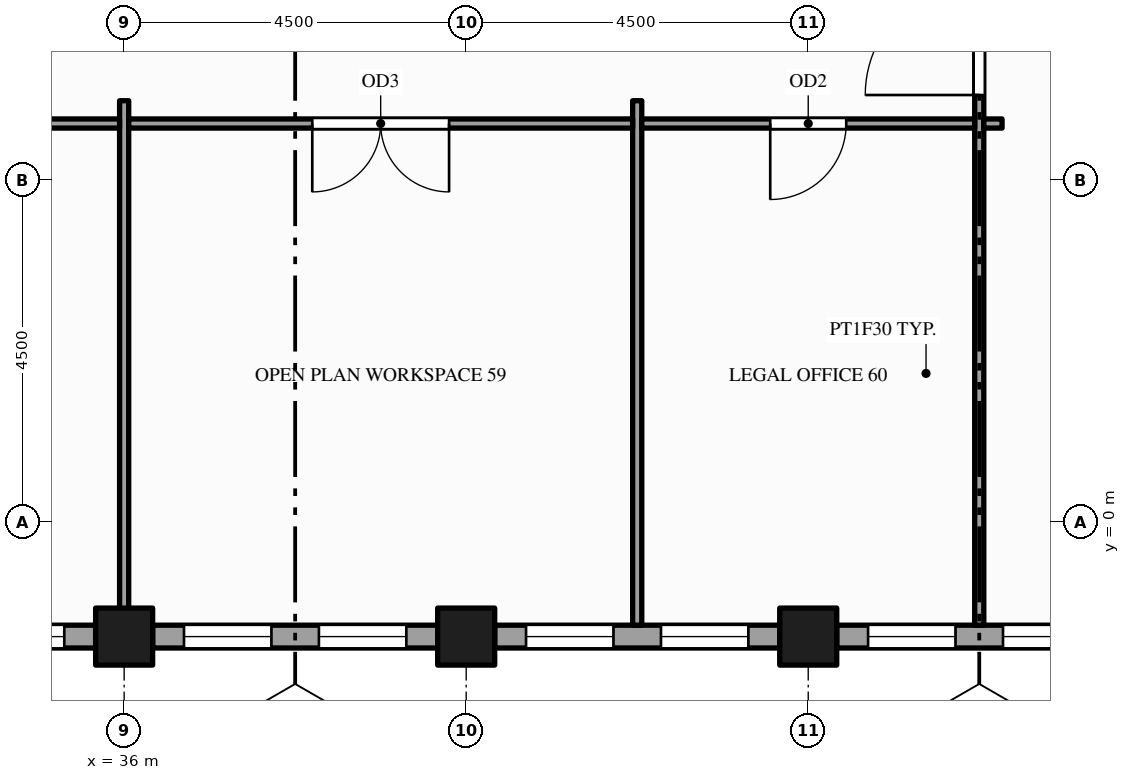
"""IFC4 building model, lengths in metres.
Left out: names, types, materials, properties, quantities, classifications, styles, units other than length and angle.
Written with IfcOpenShell. Run it as: python <this file> out.ifc"""

import sys

from ifc_helpers import new_model, si_unit, direction, frame, frame_2d, origin, origin_2d, place, context, subcontext, project, spatial, rectangle, hollow_rectangle, extrude, element, fill, save


model = new_model("IFC4")
c1 = context("Model", 3, precision=1e-05, world=origin(), true_north=direction((0.0, 1.0)))
c2 = subcontext(c1, "Body", "Model", "MODEL_VIEW")
j1 = project(units=[si_unit("LENGTHUNIT", "METRE"), si_unit("PLANEANGLEUNIT", "RADIAN")], contexts=[c1])
p1 = place(None, origin())
s1 = spatial("IfcSite", under=j1, at=p1, CompositionType="ELEMENT")
p2 = place(p1, origin())
s2 = spatial("IfcBuilding", under=s1, at=p2, CompositionType="ELEMENT")
p3 = place(p2, frame((0.0, 0.0, 207.0)))
s3 = spatial("IfcBuildingStorey", under=s2, at=p3, CompositionType="ELEMENT", Elevation=207.0)
for number, where, z_axis, x_axis in (
    (1, (36.0, -1.5, -0.15), (0.0, 0.0, 1.0), (1.0, 0.0, 0.0)),
    (2, (40.5, -1.5, -0.15), (0.0, 0.0, 1.0), (1.0, 0.0, 0.0)),
    (3, (45.0, -1.5, -0.15), (0.0, 0.0, 1.0), (1.0, 0.0, 0.0)),
):
    element("IfcColumn", number, at=place(p3, frame(where, z_axis=z_axis, x_axis=x_axis)), inside=s3, PredefinedType="COLUMN", context=c2, shape_type="SweptSolid", body=[
        extrude(hollow_rectangle(XDim=0.75, YDim=0.75, WallThickness=0.036, at=origin_2d()), origin(), (0.0, 0.0, 1.0), 4.0),
    ])
p4 = place(p3, frame((31.875, -1.5, 0.0), z_axis=(0.0, 0.0, 1.0), x_axis=(1.0, 0.0, 0.0)))
e4 = element("IfcWall", 4, at=p4, inside=s3, PredefinedType="STANDARD", context=c2, shape_type="SweptSolid", body=[
    extrude(rectangle(XDim=3.75, YDim=0.3, at=frame_2d((1.875, 0.0))), origin(), (0.0, 0.0, 1.0), 2.87),
])
p5 = place(p4, frame((0.413, 0.0, 0.9)))
e5 = element("IfcOpeningElement", 5, at=p5, cuts=e4, PredefinedType="OPENING", context=c2, shape_type="SweptSolid", body=[
    extrude(rectangle(XDim=1.15, YDim=1.75, at=frame_2d((0.575, 0.875))), frame((0.0, 0.16, 0.0), z_axis=(0.0, -1.0, 0.0), x_axis=(1.0, 0.0, 0.0)), (0.0, 0.0, 1.0), 0.32),
])
p6 = place(p4, frame((2.188, 0.0, 0.9)))
e6 = element("IfcOpeningElement", 6, at=p6, cuts=e4, PredefinedType="OPENING", context=c2, shape_type="SweptSolid", body=[
    extrude(rectangle(XDim=1.15, YDim=1.75, at=frame_2d((0.575, 0.875))), frame((0.0, 0.16, 0.0), z_axis=(0.0, -1.0, 0.0), x_axis=(1.0, 0.0, 0.0)), (0.0, 0.0, 1.0), 0.32),
])
p7 = place(p3, frame((36.375, -1.5, 0.0), z_axis=(0.0, 0.0, 1.0), x_axis=(1.0, 0.0, 0.0)))
e7 = element("IfcWall", 7, at=p7, inside=s3, PredefinedType="STANDARD", context=c2, shape_type="SweptSolid", body=[
    extrude(rectangle(XDim=3.75, YDim=0.3, at=frame_2d((1.875, 0.0))), origin(), (0.0, 0.0, 1.0), 2.87),
])
p8 = place(p7, frame((0.413, 0.0, 0.9)))
e8 = element("IfcOpeningElement", 8, at=p8, cuts=e7, PredefinedType="OPENING", context=c2, shape_type="SweptSolid", body=[
    extrude(rectangle(XDim=1.15, YDim=1.75, at=frame_2d((0.575, 0.875))), frame((0.0, 0.16, 0.0), z_axis=(0.0, -1.0, 0.0), x_axis=(1.0, 0.0, 0.0)), (0.0, 0.0, 1.0), 0.32),
])
p9 = place(p7, frame((2.188, 0.0, 0.9)))
e9 = element("IfcOpeningElement", 9, at=p9, cuts=e7, PredefinedType="OPENING", context=c2, shape_type="SweptSolid", body=[
    extrude(rectangle(XDim=1.15, YDim=1.75, at=frame_2d((0.575, 0.875))), frame((0.0, 0.16, 0.0), z_axis=(0.0, -1.0, 0.0), x_axis=(1.0, 0.0, 0.0)), (0.0, 0.0, 1.0), 0.32),
])
p10 = place(p3, frame((40.875, -1.5, 0.0), z_axis=(0.0, 0.0, 1.0), x_axis=(1.0, 0.0, 0.0)))
e10 = element("IfcWall", 10, at=p10, inside=s3, PredefinedType="STANDARD", context=c2, shape_type="SweptSolid", body=[
    extrude(rectangle(XDim=3.75, YDim=0.3, at=frame_2d((1.875, 0.0))), origin(), (0.0, 0.0, 1.0), 2.87),
])
p11 = place(p10, frame((0.413, 0.0, 0.9)))
e11 = element("IfcOpeningElement", 11, at=p11, cuts=e10, PredefinedType="OPENING", context=c2, shape_type="SweptSolid", body=[
    extrude(rectangle(XDim=1.15, YDim=1.75, at=frame_2d((0.575, 0.875))), frame((0.0, 0.16, 0.0), z_axis=(0.0, -1.0, 0.0), x_axis=(1.0, 0.0, 0.0)), (0.0, 0.0, 1.0), 0.32),
])
p12 = place(p10, frame((2.188, 0.0, 0.9)))
e12 = element("IfcOpeningElement", 12, at=p12, cuts=e10, PredefinedType="OPENING", context=c2, shape_type="SweptSolid", body=[
    extrude(rectangle(XDim=1.15, YDim=1.75, at=frame_2d((0.575, 0.875))), frame((0.0, 0.16, 0.0), z_axis=(0.0, -1.0, 0.0), x_axis=(1.0, 0.0, 0.0)), (0.0, 0.0, 1.0), 0.32),
])
p13 = place(p3, frame((45.375, -1.5, 0.0), z_axis=(0.0, 0.0, 1.0), x_axis=(1.0, 0.0, 0.0)))
e13 = element("IfcWall", 13, at=p13, inside=s3, PredefinedType="STANDARD", context=c2, shape_type="SweptSolid", body=[
    extrude(rectangle(XDim=3.75, YDim=0.3, at=frame_2d((1.875, 0.0))), origin(), (0.0, 0.0, 1.0), 2.87),
])
p14 = place(p13, frame((0.413, 0.0, 0.9)))
e14 = element("IfcOpeningElement", 14, at=p14, cuts=e13, PredefinedType="OPENING", context=c2, shape_type="SweptSolid", body=[
    extrude(rectangle(XDim=1.15, YDim=1.75, at=frame_2d((0.575, 0.875))), frame((0.0, 0.16, 0.0), z_axis=(0.0, -1.0, 0.0), x_axis=(1.0, 0.0, 0.0)), (0.0, 0.0, 1.0), 0.32),
])
p15 = place(p13, frame((2.188, 0.0, 0.9)))
e15 = element("IfcOpeningElement", 15, at=p15, cuts=e13, PredefinedType="OPENING", context=c2, shape_type="SweptSolid", body=[
    extrude(rectangle(XDim=1.15, YDim=1.75, at=frame_2d((0.575, 0.875))), frame((0.0, 0.16, 0.0), z_axis=(0.0, -1.0, 0.0), x_axis=(1.0, 0.0, 0.0)), (0.0, 0.0, 1.0), 0.32),
])
for number, where, z_axis, x_axis in (
    (16, (36.0, -1.35, 0.0), (0.0, 0.0, 1.0), (0.0, 1.0, 0.0)),
    (17, (42.75, -1.35, 0.0), (0.0, 0.0, 1.0), (0.0, 1.0, 0.0)),
):
    element("IfcWall", number, at=place(p3, frame(where, z_axis=z_axis, x_axis=x_axis)), inside=s3, PredefinedType="PARTITIONING", context=c2, shape_type="SweptSolid", body=[
        extrude(rectangle(XDim=6.9, YDim=0.12, at=frame_2d((3.45, 0.0))), origin(), (0.0, 0.0, 1.0), 2.87),
    ])
p16 = place(p3, frame((47.25, -1.35, 0.0), z_axis=(0.0, 0.0, 1.0), x_axis=(0.0, 1.0, 0.0)))
e18 = element("IfcWall", 18, at=p16, inside=s3, PredefinedType="PARTITIONING", context=c2, shape_type="SweptSolid", body=[
    extrude(rectangle(XDim=22.2, YDim=0.12, at=frame_2d((11.1, 0.0))), origin(), (0.0, 0.0, 1.0), 2.87),
])
p17 = place(p16, frame((6.975, 0.0, 0.0)))
e19 = element("IfcOpeningElement", 19, at=p17, cuts=e18, PredefinedType="OPENING", context=c2, shape_type="SweptSolid", body=[
    extrude(rectangle(XDim=1.5, YDim=2.1, at=frame_2d((0.75, 1.05))), frame((0.0, 0.07, 0.0), z_axis=(0.0, -1.0, 0.0), x_axis=(1.0, 0.0, 0.0)), (0.0, 0.0, 1.0), 0.14),
])
p18 = place(p16, frame((13.725, 0.0, 0.0)))
e20 = element("IfcOpeningElement", 20, at=p18, cuts=e18, PredefinedType="OPENING", context=c2, shape_type="SweptSolid", body=[
    extrude(rectangle(XDim=1.5, YDim=2.1, at=frame_2d((0.75, 1.05))), frame((0.0, 0.07, 0.0), z_axis=(0.0, -1.0, 0.0), x_axis=(1.0, 0.0, 0.0)), (0.0, 0.0, 1.0), 0.14),
])
p19 = place(p16, frame((9.29, 0.0, 0.0)))
e21 = element("IfcOpeningElement", 21, at=p19, cuts=e18, PredefinedType="OPENING", context=c2, shape_type="SweptSolid", body=[
    extrude(rectangle(XDim=0.9, YDim=2.1, at=frame_2d((0.45, 1.05))), frame((0.0, 0.07, 0.0), z_axis=(0.0, -1.0, 0.0), x_axis=(1.0, 0.0, 0.0)), (0.0, 0.0, 1.0), 0.14),
])
p20 = place(p16, frame((10.65, 0.0, 0.0)))
e22 = element("IfcOpeningElement", 22, at=p20, cuts=e18, PredefinedType="OPENING", context=c2, shape_type="SweptSolid", body=[
    extrude(rectangle(XDim=0.9, YDim=2.1, at=frame_2d((0.45, 1.05))), frame((0.0, 0.07, 0.0), z_axis=(0.0, -1.0, 0.0), x_axis=(1.0, 0.0, 0.0)), (0.0, 0.0, 1.0), 0.14),
])
p21 = place(p16, frame((12.01, 0.0, 0.0)))
e23 = element("IfcOpeningElement", 23, at=p21, cuts=e18, PredefinedType="OPENING", context=c2, shape_type="SweptSolid", body=[
    extrude(rectangle(XDim=1.0, YDim=2.1, at=frame_2d((0.5, 1.05))), frame((0.0, 0.07, 0.0), z_axis=(0.0, -1.0, 0.0), x_axis=(1.0, 0.0, 0.0)), (0.0, 0.0, 1.0), 0.14),
])
p22 = place(p3, frame((31.56, 5.25, 0.0), z_axis=(0.0, 0.0, 1.0), x_axis=(1.0, 0.0, 0.0)))
e24 = element("IfcWall", 24, at=p22, inside=s3, PredefinedType="PARTITIONING", context=c2, shape_type="SweptSolid", body=[
    extrude(rectangle(XDim=4.38, YDim=0.12, at=frame_2d((2.19, 0.0))), origin(), (0.0, 0.0, 1.0), 2.87),
])
p23 = place(p22, frame((1.69, 0.0, 0.0)))
e25 = element("IfcOpeningElement", 25, at=p23, cuts=e24, PredefinedType="OPENING", context=c2, shape_type="SweptSolid", body=[
    extrude(rectangle(XDim=1.0, YDim=2.1, at=frame_2d((0.5, 1.05))), frame((0.0, 0.07, 0.0), z_axis=(0.0, -1.0, 0.0), x_axis=(1.0, 0.0, 0.0)), (0.0, 0.0, 1.0), 0.14),
])
p24 = place(p3, frame((36.06, 5.25, 0.0), z_axis=(0.0, 0.0, 1.0), x_axis=(1.0, 0.0, 0.0)))
e26 = element("IfcWall", 26, at=p24, inside=s3, PredefinedType="PARTITIONING", context=c2, shape_type="SweptSolid", body=[
    extrude(rectangle(XDim=6.63, YDim=0.12, at=frame_2d((3.315, 0.0))), origin(), (0.0, 0.0, 1.0), 2.87),
])
p25 = place(p24, frame((2.415, 0.0, 0.0)))
e27 = element("IfcOpeningElement", 27, at=p25, cuts=e26, PredefinedType="OPENING", context=c2, shape_type="SweptSolid", body=[
    extrude(rectangle(XDim=1.8, YDim=2.1, at=frame_2d((0.9, 1.05))), frame((0.0, 0.07, 0.0), z_axis=(0.0, -1.0, 0.0), x_axis=(1.0, 0.0, 0.0)), (0.0, 0.0, 1.0), 0.14),
])
p26 = place(p3, frame((42.81, 5.25, 0.0), z_axis=(0.0, 0.0, 1.0), x_axis=(1.0, 0.0, 0.0)))
e28 = element("IfcWall", 28, at=p26, inside=s3, PredefinedType="PARTITIONING", context=c2, shape_type="SweptSolid", body=[
    extrude(rectangle(XDim=4.38, YDim=0.12, at=frame_2d((2.19, 0.0))), origin(), (0.0, 0.0, 1.0), 2.87),
])
p27 = place(p26, frame((1.69, 0.0, 0.0)))
e29 = element("IfcOpeningElement", 29, at=p27, cuts=e28, PredefinedType="OPENING", context=c2, shape_type="SweptSolid", body=[
    extrude(rectangle(XDim=1.0, YDim=2.1, at=frame_2d((0.5, 1.05))), frame((0.0, 0.07, 0.0), z_axis=(0.0, -1.0, 0.0), x_axis=(1.0, 0.0, 0.0)), (0.0, 0.0, 1.0), 0.14),
])
p28 = place(p3, frame((47.31, 5.25, 0.0), z_axis=(0.0, 0.0, 1.0), x_axis=(1.0, 0.0, 0.0)))
e30 = element("IfcWall", 30, at=p28, inside=s3, PredefinedType="PARTITIONING", context=c2, shape_type="SweptSolid", body=[
    extrude(rectangle(XDim=0.24, YDim=0.12, at=frame_2d((0.12, 0.0))), origin(), (0.0, 0.0, 1.0), 2.87),
])
p29 = place(p6, origin())
e31 = element("IfcWindow", 31, at=p29, inside=s3, PartitioningType="SINGLE_PANEL", PredefinedType="WINDOW", context=c2, shape_type="SweptSolid", body=[
    extrude(rectangle(XDim=1.15, YDim=1.75, at=frame_2d((0.575, 0.875))), frame((0.0, 0.03, 0.0), z_axis=(0.0, -1.0, 0.0), x_axis=(1.0, 0.0, 0.0)), (0.0, 0.0, 1.0), 0.06),
])
fill(e6, e31)
p30 = place(p8, origin())
e32 = element("IfcWindow", 32, at=p30, inside=s3, PartitioningType="SINGLE_PANEL", PredefinedType="WINDOW", context=c2, shape_type="SweptSolid", body=[
    extrude(rectangle(XDim=1.15, YDim=1.75, at=frame_2d((0.575, 0.875))), frame((0.0, 0.03, 0.0), z_axis=(0.0, -1.0, 0.0), x_axis=(1.0, 0.0, 0.0)), (0.0, 0.0, 1.0), 0.06),
])
fill(e8, e32)
p31 = place(p9, origin())
e33 = element("IfcWindow", 33, at=p31, inside=s3, PartitioningType="SINGLE_PANEL", PredefinedType="WINDOW", context=c2, shape_type="SweptSolid", body=[
    extrude(rectangle(XDim=1.15, YDim=1.75, at=frame_2d((0.575, 0.875))), frame((0.0, 0.03, 0.0), z_axis=(0.0, -1.0, 0.0), x_axis=(1.0, 0.0, 0.0)), (0.0, 0.0, 1.0), 0.06),
])
fill(e9, e33)
p32 = place(p11, origin())
e34 = element("IfcWindow", 34, at=p32, inside=s3, PartitioningType="SINGLE_PANEL", PredefinedType="WINDOW", context=c2, shape_type="SweptSolid", body=[
    extrude(rectangle(XDim=1.15, YDim=1.75, at=frame_2d((0.575, 0.875))), frame((0.0, 0.03, 0.0), z_axis=(0.0, -1.0, 0.0), x_axis=(1.0, 0.0, 0.0)), (0.0, 0.0, 1.0), 0.06),
])
fill(e11, e34)
p33 = place(p12, origin())
e35 = element("IfcWindow", 35, at=p33, inside=s3, PartitioningType="SINGLE_PANEL", PredefinedType="WINDOW", context=c2, shape_type="SweptSolid", body=[
    extrude(rectangle(XDim=1.15, YDim=1.75, at=frame_2d((0.575, 0.875))), frame((0.0, 0.03, 0.0), z_axis=(0.0, -1.0, 0.0), x_axis=(1.0, 0.0, 0.0)), (0.0, 0.0, 1.0), 0.06),
])
fill(e12, e35)
p34 = place(p14, origin())
e36 = element("IfcWindow", 36, at=p34, inside=s3, PartitioningType="SINGLE_PANEL", PredefinedType="WINDOW", context=c2, shape_type="SweptSolid", body=[
    extrude(rectangle(XDim=1.15, YDim=1.75, at=frame_2d((0.575, 0.875))), frame((0.0, 0.03, 0.0), z_axis=(0.0, -1.0, 0.0), x_axis=(1.0, 0.0, 0.0)), (0.0, 0.0, 1.0), 0.06),
])
fill(e14, e36)
p35 = place(p15, origin())
e37 = element("IfcWindow", 37, at=p35, inside=s3, PartitioningType="SINGLE_PANEL", PredefinedType="WINDOW", context=c2, shape_type="SweptSolid", body=[
    extrude(rectangle(XDim=1.15, YDim=1.75, at=frame_2d((0.575, 0.875))), frame((0.0, 0.03, 0.0), z_axis=(0.0, -1.0, 0.0), x_axis=(1.0, 0.0, 0.0)), (0.0, 0.0, 1.0), 0.06),
])
fill(e15, e37)
p36 = place(p17, origin())
e38 = element("IfcDoor", 38, at=p36, inside=s3, OperationType="SINGLE_SWING_LEFT", PredefinedType="DOOR", context=c2, shape_type="SweptSolid", body=[
    extrude(rectangle(XDim=1.5, YDim=2.1, at=frame_2d((0.75, 1.05))), frame((0.0, 0.025, 0.0), z_axis=(0.0, -1.0, 0.0), x_axis=(1.0, 0.0, 0.0)), (0.0, 0.0, 1.0), 0.05),
])
fill(e19, e38)
p37 = place(p25, origin())
e39 = element("IfcDoor", 39, at=p37, inside=s3, OperationType="DOUBLE_DOOR_SINGLE_SWING", PredefinedType="DOOR", context=c2, shape_type="SweptSolid", body=[
    extrude(rectangle(XDim=1.8, YDim=2.1, at=frame_2d((0.9, 1.05))), frame((0.0, 0.025, 0.0), z_axis=(0.0, -1.0, 0.0), x_axis=(1.0, 0.0, 0.0)), (0.0, 0.0, 1.0), 0.05),
])
fill(e27, e39)
p38 = place(p27, origin())
e40 = element("IfcDoor", 40, at=p38, inside=s3, OperationType="SINGLE_SWING_LEFT", PredefinedType="DOOR", context=c2, shape_type="SweptSolid", body=[
    extrude(rectangle(XDim=1.0, YDim=2.1, at=frame_2d((0.5, 1.05))), frame((0.0, 0.025, 0.0), z_axis=(0.0, -1.0, 0.0), x_axis=(1.0, 0.0, 0.0)), (0.0, 0.0, 1.0), 0.05),
])
fill(e29, e40)
save(model, sys.argv[1])
